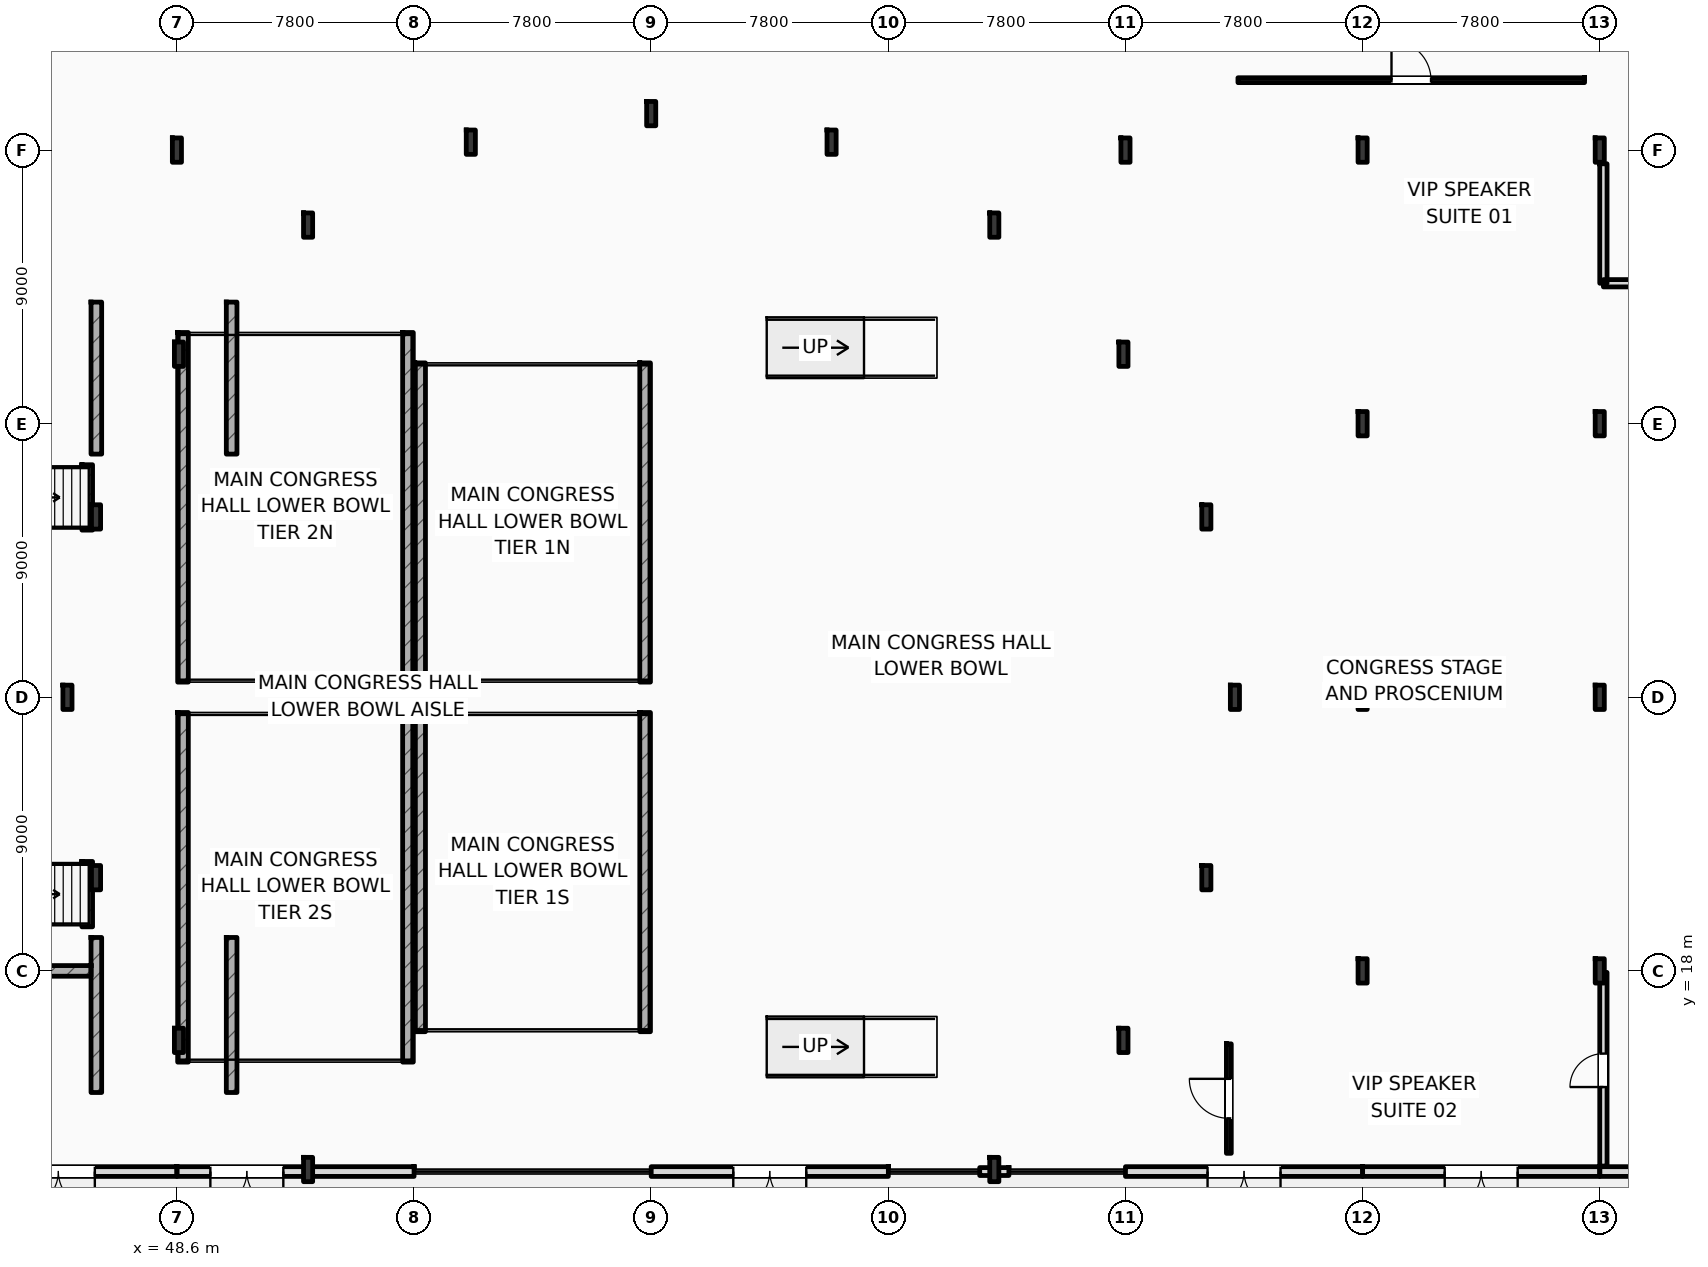
"""IFC4 building model, lengths in metres.
Left out: names, types, materials, properties, quantities, classifications, styles, units other than length and angle.
Written with IfcOpenShell. Run it as: python <this file> out.ifc"""

import sys

from ifc_helpers import new_model, si_unit, direction, frame, frame_2d, origin, origin_2d, place, context, subcontext, project, spatial, rectangle, i_section, extrude, element, fill, save


model = new_model("IFC4")
c1 = context("Model", 3, precision=1e-05, world=origin(), true_north=direction((0.0, 1.0)))
c2 = subcontext(c1, "Body", "Model", "MODEL_VIEW")
j1 = project(units=[si_unit("LENGTHUNIT", "METRE"), si_unit("PLANEANGLEUNIT", "RADIAN")], contexts=[c1])
p1 = place(None, origin())
s1 = spatial("IfcSite", under=j1, at=p1, CompositionType="ELEMENT")
p2 = place(p1, origin())
s2 = spatial("IfcBuilding", under=s1, at=p2, CompositionType="ELEMENT")
p3 = place(p2, origin())
s3 = spatial("IfcBuildingStorey", under=s2, at=p3, CompositionType="ELEMENT", Elevation=0.0)
for number, where, z_axis, x_axis in (
    (1, (48.6, 45.0, 0.0), (0.0, 0.0, 1.0), (1.0, 0.0, 0.0)),
    (2, (79.8, 45.0, 0.0), (0.0, 0.0, 1.0), (1.0, 0.0, 0.0)),
    (3, (87.6, 18.0, 0.0), (0.0, 0.0, 1.0), (1.0, 0.0, 0.0)),
    (4, (87.6, 27.0, 0.0), (0.0, 0.0, 1.0), (1.0, 0.0, 0.0)),
    (5, (87.6, 36.0, 0.0), (0.0, 0.0, 1.0), (1.0, 0.0, 0.0)),
    (6, (87.6, 45.0, 0.0), (0.0, 0.0, 1.0), (1.0, 0.0, 0.0)),
    (7, (95.4, 18.0, 0.0), (0.0, 0.0, 1.0), (1.0, 0.0, 0.0)),
    (8, (95.4, 27.0, 0.0), (0.0, 0.0, 1.0), (1.0, 0.0, 0.0)),
    (9, (95.4, 36.0, 0.0), (0.0, 0.0, 1.0), (1.0, 0.0, 0.0)),
    (10, (95.4, 45.0, 0.0), (0.0, 0.0, 1.0), (1.0, 0.0, 0.0)),
    (11, (83.4, 27.0, 0.0), (0.0, 0.0, 1.0), (1.0, 0.0, 0.0)),
    (12, (82.46, 32.933, 0.0), (0.0, 0.0, 1.0), (1.0, 0.0, 0.0)),
    (13, (79.733, 38.285, 0.0), (0.0, 0.0, 1.0), (1.0, 0.0, 0.0)),
    (14, (75.486, 42.533, 0.0), (0.0, 0.0, 1.0), (1.0, 0.0, 0.0)),
    (15, (70.133, 45.26, 0.0), (0.0, 0.0, 1.0), (1.0, 0.0, 0.0)),
    (16, (64.2, 46.2, 0.0), (0.0, 0.0, 1.0), (1.0, 0.0, 0.0)),
    (17, (58.267, 45.26, 0.0), (0.0, 0.0, 1.0), (1.0, 0.0, 0.0)),
    (18, (52.915, 42.533, 0.0), (0.0, 0.0, 1.0), (1.0, 0.0, 0.0)),
    (19, (48.667, 38.285, 0.0), (0.0, 0.0, 1.0), (1.0, 0.0, 0.0)),
    (20, (45.94, 32.933, 0.0), (0.0, 0.0, 1.0), (1.0, 0.0, 0.0)),
    (21, (45.0, 27.0, 0.0), (0.0, 0.0, 1.0), (1.0, 0.0, 0.0)),
    (22, (45.94, 21.067, 0.0), (0.0, 0.0, 1.0), (1.0, 0.0, 0.0)),
    (23, (48.667, 15.715, 0.0), (0.0, 0.0, 1.0), (1.0, 0.0, 0.0)),
    (24, (52.915, 11.467, 0.0), (0.0, 0.0, 1.0), (1.0, 0.0, 0.0)),
    (25, (75.486, 11.467, 0.0), (0.0, 0.0, 1.0), (1.0, 0.0, 0.0)),
    (26, (79.733, 15.715, 0.0), (0.0, 0.0, 1.0), (1.0, 0.0, 0.0)),
    (27, (82.46, 21.067, 0.0), (0.0, 0.0, 1.0), (1.0, 0.0, 0.0)),
):
    element("IfcColumn", number, at=place(p3, frame(where, z_axis=z_axis, x_axis=x_axis)), inside=s3, PredefinedType="COLUMN", context=c2, shape_type="SweptSolid", body=[
        extrude(i_section(OverallWidth=0.3, OverallDepth=0.8, WebThickness=0.018, FlangeThickness=0.033, FilletRadius=0.03, at=origin_2d()), origin(), (0.0, 0.0, 1.0), 6.0),
    ])
for number, where, z_axis, x_axis in (
    (28, (56.6, 16.0, 0.0), (0.0, 0.0, 1.0), (0.0, 1.0, 0.0)),
    (29, (64.0, 16.0, 0.0), (0.0, 0.0, 1.0), (0.0, 1.0, 0.0)),
    (30, (56.6, 27.5, 0.0), (0.0, 0.0, 1.0), (0.0, 1.0, 0.0)),
    (31, (64.0, 27.5, 0.0), (0.0, 0.0, 1.0), (0.0, 1.0, 0.0)),
):
    element("IfcWall", number, at=place(p3, frame(where, z_axis=z_axis, x_axis=x_axis)), inside=s3, PredefinedType="SHEAR", context=c2, shape_type="SweptSolid", body=[
        extrude(rectangle(XDim=10.5, YDim=0.35, at=frame_2d((5.25, 0.0))), origin(), (0.0, 0.0, 1.0), 1.04),
    ])
for number, where, z_axis, x_axis in (
    (32, (48.8, 15.0, 0.0), (0.0, 0.0, 1.0), (0.0, 1.0, 0.0)),
    (33, (56.2, 15.0, 0.0), (0.0, 0.0, 1.0), (0.0, 1.0, 0.0)),
    (34, (48.8, 27.5, 0.0), (0.0, 0.0, 1.0), (0.0, 1.0, 0.0)),
    (35, (56.2, 27.5, 0.0), (0.0, 0.0, 1.0), (0.0, 1.0, 0.0)),
):
    element("IfcWall", number, at=place(p3, frame(where, z_axis=z_axis, x_axis=x_axis)), inside=s3, PredefinedType="SHEAR", context=c2, shape_type="SweptSolid", body=[
        extrude(rectangle(XDim=11.5, YDim=0.35, at=frame_2d((5.75, 0.0))), origin(), (0.0, 0.0, 1.0), 2.54),
    ])
for number, where, z_axis, x_axis in (
    (36, (45.95, 14.0, 0.0), (0.0, 0.0, 1.0), (0.0, 1.0, 0.0)),
    (37, (50.4, 14.0, 0.0), (0.0, 0.0, 1.0), (0.0, 1.0, 0.0)),
):
    element("IfcWall", number, at=place(p3, frame(where, z_axis=z_axis, x_axis=x_axis)), inside=s3, PredefinedType="SHEAR", context=c2, shape_type="SweptSolid", body=[
        extrude(rectangle(XDim=5.1, YDim=0.35, at=frame_2d((2.55, 0.0))), origin(), (0.0, 0.0, 1.0), 5.7),
    ])
for number, where, z_axis, x_axis in (
    (38, (45.95, 35.0, 0.0), (0.0, 0.0, 1.0), (0.0, 1.0, 0.0)),
    (39, (50.4, 35.0, 0.0), (0.0, 0.0, 1.0), (0.0, 1.0, 0.0)),
):
    element("IfcWall", number, at=place(p3, frame(where, z_axis=z_axis, x_axis=x_axis)), inside=s3, PredefinedType="SHEAR", context=c2, shape_type="SweptSolid", body=[
        extrude(rectangle(XDim=5.0, YDim=0.35, at=frame_2d((2.5, 0.0))), origin(), (0.0, 0.0, 1.0), 5.7),
    ])
p4 = place(p3, frame((33.0, 18.0, 0.0), z_axis=(0.0, 0.0, 1.0), x_axis=(1.0, 0.0, 0.0)))
e40 = element("IfcWall", 40, at=p4, inside=s3, PredefinedType="SHEAR", context=c2, shape_type="SweptSolid", body=[
    extrude(rectangle(XDim=12.775, YDim=0.35, at=frame_2d((6.387, 0.0))), origin(), (0.0, 0.0, 1.0), 5.7),
])
p5 = place(p3, frame((40.8, 11.4, 0.0), z_axis=(0.0, 0.0, 1.0), x_axis=(1.0, 0.0, 0.0)))
e41 = element("IfcWall", 41, at=p5, inside=s3, PredefinedType="STANDARD", context=c2, shape_type="SweptSolid", body=[
    extrude(rectangle(XDim=7.8, YDim=0.32, at=frame_2d((3.9, 0.0))), origin(), (0.0, 0.0, 1.0), 5.7),
])
p6 = place(p5, frame((2.7, 0.0, 0.0)))
e42 = element("IfcOpeningElement", 42, at=p6, cuts=e41, PredefinedType="OPENING", context=c2, shape_type="SweptSolid", body=[
    extrude(rectangle(XDim=2.4, YDim=2.6, at=frame_2d((1.2, 1.3))), frame((0.0, 0.17, 0.0), z_axis=(0.0, -1.0, 0.0), x_axis=(1.0, 0.0, 0.0)), (0.0, 0.0, 1.0), 0.34),
])
p7 = place(p3, frame((48.6, 11.4, 0.0), z_axis=(0.0, 0.0, 1.0), x_axis=(1.0, 0.0, 0.0)))
e43 = element("IfcWall", 43, at=p7, inside=s3, PredefinedType="STANDARD", context=c2, shape_type="SweptSolid", body=[
    extrude(rectangle(XDim=7.8, YDim=0.32, at=frame_2d((3.9, 0.0))), origin(), (0.0, 0.0, 1.0), 5.7),
])
p8 = place(p7, frame((1.1, 0.0, 0.0)))
e44 = element("IfcOpeningElement", 44, at=p8, cuts=e43, PredefinedType="OPENING", context=c2, shape_type="SweptSolid", body=[
    extrude(rectangle(XDim=2.4, YDim=2.6, at=frame_2d((1.2, 1.3))), frame((0.0, 0.17, 0.0), z_axis=(0.0, -1.0, 0.0), x_axis=(1.0, 0.0, 0.0)), (0.0, 0.0, 1.0), 0.34),
])
p9 = place(p3, frame((64.2, 11.4, 0.0), z_axis=(0.0, 0.0, 1.0), x_axis=(1.0, 0.0, 0.0)))
e45 = element("IfcWall", 45, at=p9, inside=s3, PredefinedType="STANDARD", context=c2, shape_type="SweptSolid", body=[
    extrude(rectangle(XDim=7.8, YDim=0.32, at=frame_2d((3.9, 0.0))), origin(), (0.0, 0.0, 1.0), 5.7),
])
p10 = place(p9, frame((2.7, 0.0, 0.0)))
e46 = element("IfcOpeningElement", 46, at=p10, cuts=e45, PredefinedType="OPENING", context=c2, shape_type="SweptSolid", body=[
    extrude(rectangle(XDim=2.4, YDim=2.6, at=frame_2d((1.2, 1.3))), frame((0.0, 0.17, 0.0), z_axis=(0.0, -1.0, 0.0), x_axis=(1.0, 0.0, 0.0)), (0.0, 0.0, 1.0), 0.34),
])
p11 = place(p3, frame((75.006, 11.4, 0.0), z_axis=(0.0, 0.0, 1.0), x_axis=(1.0, 0.0, 0.0)))
e47 = element("IfcWall", 47, at=p11, inside=s3, PredefinedType="STANDARD", context=c2, shape_type="SweptSolid", body=[
    extrude(rectangle(XDim=0.96, YDim=0.26, at=frame_2d((0.48, 0.0))), origin(), (0.0, 0.0, 1.0), 5.3),
])
p12 = place(p3, frame((79.8, 11.4, 0.0), z_axis=(0.0, 0.0, 1.0), x_axis=(1.0, 0.0, 0.0)))
e48 = element("IfcWall", 48, at=p12, inside=s3, PredefinedType="STANDARD", context=c2, shape_type="SweptSolid", body=[
    extrude(rectangle(XDim=7.8, YDim=0.32, at=frame_2d((3.9, 0.0))), origin(), (0.0, 0.0, 1.0), 5.7),
])
p13 = place(p12, frame((2.7, 0.0, 0.0)))
e49 = element("IfcOpeningElement", 49, at=p13, cuts=e48, PredefinedType="OPENING", context=c2, shape_type="SweptSolid", body=[
    extrude(rectangle(XDim=2.4, YDim=2.6, at=frame_2d((1.2, 1.3))), frame((0.0, 0.17, 0.0), z_axis=(0.0, -1.0, 0.0), x_axis=(1.0, 0.0, 0.0)), (0.0, 0.0, 1.0), 0.34),
])
p14 = place(p3, frame((87.6, 11.4, 0.0), z_axis=(0.0, 0.0, 1.0), x_axis=(1.0, 0.0, 0.0)))
e50 = element("IfcWall", 50, at=p14, inside=s3, PredefinedType="STANDARD", context=c2, shape_type="SweptSolid", body=[
    extrude(rectangle(XDim=7.8, YDim=0.32, at=frame_2d((3.9, 0.0))), origin(), (0.0, 0.0, 1.0), 5.7),
])
p15 = place(p14, frame((2.7, 0.0, 0.0)))
e51 = element("IfcOpeningElement", 51, at=p15, cuts=e50, PredefinedType="OPENING", context=c2, shape_type="SweptSolid", body=[
    extrude(rectangle(XDim=2.4, YDim=2.6, at=frame_2d((1.2, 1.3))), frame((0.0, 0.17, 0.0), z_axis=(0.0, -1.0, 0.0), x_axis=(1.0, 0.0, 0.0)), (0.0, 0.0, 1.0), 0.34),
])
p16 = place(p3, frame((95.4, 11.4, 0.0), z_axis=(0.0, 0.0, 1.0), x_axis=(1.0, 0.0, 0.0)))
e52 = element("IfcWall", 52, at=p16, inside=s3, PredefinedType="STANDARD", context=c2, shape_type="SweptSolid", body=[
    extrude(rectangle(XDim=7.8, YDim=0.32, at=frame_2d((3.9, 0.0))), origin(), (0.0, 0.0, 1.0), 5.7),
])
p17 = place(p16, frame((2.7, 0.0, 0.0)))
e53 = element("IfcOpeningElement", 53, at=p17, cuts=e52, PredefinedType="OPENING", context=c2, shape_type="SweptSolid", body=[
    extrude(rectangle(XDim=2.4, YDim=2.6, at=frame_2d((1.2, 1.3))), frame((0.0, 0.17, 0.0), z_axis=(0.0, -1.0, 0.0), x_axis=(1.0, 0.0, 0.0)), (0.0, 0.0, 1.0), 0.34),
])
p18 = place(p3, frame((45.65, 19.45, 0.0), z_axis=(0.0, 0.0, 1.0), x_axis=(0.0, 1.0, 0.0)))
e54 = element("IfcWall", 54, at=p18, inside=s3, PredefinedType="SHEAR", context=c2, shape_type="SweptSolid", body=[
    extrude(rectangle(XDim=2.15, YDim=0.35, at=frame_2d((1.075, 0.0))), origin(), (0.0, 0.0, 1.0), 5.7),
])
p19 = place(p3, frame((45.65, 32.5, 0.0), z_axis=(0.0, 0.0, 1.0), x_axis=(0.0, 1.0, 0.0)))
e55 = element("IfcWall", 55, at=p19, inside=s3, PredefinedType="SHEAR", context=c2, shape_type="SweptSolid", body=[
    extrude(rectangle(XDim=2.15, YDim=0.35, at=frame_2d((1.075, 0.0))), origin(), (0.0, 0.0, 1.0), 5.7),
])
p20 = place(p3, frame((83.5, 47.3, 0.0), z_axis=(0.0, 0.0, 1.0), x_axis=(1.0, 0.0, 0.0)))
e56 = element("IfcWall", 56, at=p20, inside=s3, PredefinedType="PARTITIONING", context=c2, shape_type="SweptSolid", body=[
    extrude(rectangle(XDim=11.4, YDim=0.16, at=frame_2d((5.7, 0.0))), origin(), (0.0, 0.0, 1.0), 5.7),
])
p21 = place(p20, frame((5.05, 0.0, 0.0)))
e57 = element("IfcOpeningElement", 57, at=p21, cuts=e56, PredefinedType="OPENING", context=c2, shape_type="SweptSolid", body=[
    extrude(rectangle(XDim=1.3, YDim=2.2, at=frame_2d((0.65, 1.1))), frame((0.0, 0.09, 0.0), z_axis=(0.0, -1.0, 0.0), x_axis=(1.0, 0.0, 0.0)), (0.0, 0.0, 1.0), 0.18),
])
p22 = place(p3, frame((83.2, 12.0, 0.0), z_axis=(0.0, 0.0, 1.0), x_axis=(0.0, 1.0, 0.0)))
e58 = element("IfcWall", 58, at=p22, inside=s3, PredefinedType="PARTITIONING", context=c2, shape_type="SweptSolid", body=[
    extrude(rectangle(XDim=3.6, YDim=0.16, at=frame_2d((1.8, 0.0))), origin(), (0.0, 0.0, 1.0), 5.7),
])
p23 = place(p22, frame((1.15, 0.0, 0.0)))
e59 = element("IfcOpeningElement", 59, at=p23, cuts=e58, PredefinedType="OPENING", context=c2, shape_type="SweptSolid", body=[
    extrude(rectangle(XDim=1.3, YDim=2.2, at=frame_2d((0.65, 1.1))), frame((0.0, 0.09, 0.0), z_axis=(0.0, -1.0, 0.0), x_axis=(1.0, 0.0, 0.0)), (0.0, 0.0, 1.0), 0.18),
])
p24 = place(p3, frame((95.52, 11.58, 0.0), z_axis=(0.0, 0.0, 1.0), x_axis=(0.0, 1.0, 0.0)))
e60 = element("IfcWall", 60, at=p24, inside=s3, PredefinedType="STANDARD", context=c2, shape_type="SweptSolid", body=[
    extrude(rectangle(XDim=6.37, YDim=0.24, at=frame_2d((3.185, 0.0))), origin(), (0.0, 0.0, 1.0), 5.2),
])
p25 = place(p24, frame((2.6, 0.0, 0.0)))
e61 = element("IfcOpeningElement", 61, at=p25, cuts=e60, PredefinedType="OPENING", context=c2, shape_type="SweptSolid", body=[
    extrude(rectangle(XDim=1.1, YDim=2.2, at=frame_2d((0.55, 1.1))), frame((0.0, 0.13, 0.0), z_axis=(0.0, -1.0, 0.0), x_axis=(1.0, 0.0, 0.0)), (0.0, 0.0, 1.0), 0.26),
])
p26 = place(p3, frame((95.52, 40.62, 0.0), z_axis=(0.0, 0.0, 1.0), x_axis=(1.0, 0.0, 0.0)))
e62 = element("IfcWall", 62, at=p26, inside=s3, PredefinedType="STANDARD", context=c2, shape_type="SweptSolid", body=[
    extrude(rectangle(XDim=7.5, YDim=0.24, at=frame_2d((3.75, 0.0))), origin(), (0.0, 0.0, 1.0), 5.7),
])
p27 = place(p26, frame((3.2, 0.0, 0.0)))
e63 = element("IfcOpeningElement", 63, at=p27, cuts=e62, PredefinedType="OPENING", context=c2, shape_type="SweptSolid", body=[
    extrude(rectangle(XDim=1.1, YDim=2.2, at=frame_2d((0.55, 1.1))), frame((0.0, 0.13, 0.0), z_axis=(0.0, -1.0, 0.0), x_axis=(1.0, 0.0, 0.0)), (0.0, 0.0, 1.0), 0.26),
])
p28 = place(p3, frame((95.52, 40.62, 0.0), z_axis=(0.0, 0.0, 1.0), x_axis=(0.0, 1.0, 0.0)))
e64 = element("IfcWall", 64, at=p28, inside=s3, PredefinedType="STANDARD", context=c2, shape_type="SweptSolid", body=[
    extrude(rectangle(XDim=3.93, YDim=0.24, at=frame_2d((1.965, 0.0))), origin(), (0.0, 0.0, 1.0), 5.2),
])
p29 = place(p6, frame((2.4, 0.0, 0.0), z_axis=(0.0, 0.0, 1.0), x_axis=(-1.0, 0.0, 0.0)))
e65 = element("IfcDoor", 65, at=p29, inside=s3, OperationType="DOUBLE_SWING_LEFT", PredefinedType="DOOR", context=c2, shape_type="SweptSolid", body=[
    extrude(rectangle(XDim=2.4, YDim=2.6, at=frame_2d((1.2, 1.3))), frame((0.0, 0.025, 0.0), z_axis=(0.0, -1.0, 0.0), x_axis=(1.0, 0.0, 0.0)), (0.0, 0.0, 1.0), 0.05),
])
fill(e42, e65)
p30 = place(p8, frame((2.4, 0.0, 0.0), z_axis=(0.0, 0.0, 1.0), x_axis=(-1.0, 0.0, 0.0)))
e66 = element("IfcDoor", 66, at=p30, inside=s3, OperationType="DOUBLE_SWING_LEFT", PredefinedType="DOOR", context=c2, shape_type="SweptSolid", body=[
    extrude(rectangle(XDim=2.4, YDim=2.6, at=frame_2d((1.2, 1.3))), frame((0.0, 0.025, 0.0), z_axis=(0.0, -1.0, 0.0), x_axis=(1.0, 0.0, 0.0)), (0.0, 0.0, 1.0), 0.05),
])
fill(e44, e66)
p31 = place(p10, frame((2.4, 0.0, 0.0), z_axis=(0.0, 0.0, 1.0), x_axis=(-1.0, 0.0, 0.0)))
e67 = element("IfcDoor", 67, at=p31, inside=s3, OperationType="DOUBLE_SWING_LEFT", PredefinedType="DOOR", context=c2, shape_type="SweptSolid", body=[
    extrude(rectangle(XDim=2.4, YDim=2.6, at=frame_2d((1.2, 1.3))), frame((0.0, 0.025, 0.0), z_axis=(0.0, -1.0, 0.0), x_axis=(1.0, 0.0, 0.0)), (0.0, 0.0, 1.0), 0.05),
])
fill(e46, e67)
p32 = place(p13, frame((2.4, 0.0, 0.0), z_axis=(0.0, 0.0, 1.0), x_axis=(-1.0, 0.0, 0.0)))
e68 = element("IfcDoor", 68, at=p32, inside=s3, OperationType="DOUBLE_SWING_LEFT", PredefinedType="DOOR", context=c2, shape_type="SweptSolid", body=[
    extrude(rectangle(XDim=2.4, YDim=2.6, at=frame_2d((1.2, 1.3))), frame((0.0, 0.025, 0.0), z_axis=(0.0, -1.0, 0.0), x_axis=(1.0, 0.0, 0.0)), (0.0, 0.0, 1.0), 0.05),
])
fill(e49, e68)
p33 = place(p15, frame((2.4, 0.0, 0.0), z_axis=(0.0, 0.0, 1.0), x_axis=(-1.0, 0.0, 0.0)))
e69 = element("IfcDoor", 69, at=p33, inside=s3, OperationType="DOUBLE_SWING_LEFT", PredefinedType="DOOR", context=c2, shape_type="SweptSolid", body=[
    extrude(rectangle(XDim=2.4, YDim=2.6, at=frame_2d((1.2, 1.3))), frame((0.0, 0.025, 0.0), z_axis=(0.0, -1.0, 0.0), x_axis=(1.0, 0.0, 0.0)), (0.0, 0.0, 1.0), 0.05),
])
fill(e51, e69)
p34 = place(p21, origin())
e70 = element("IfcDoor", 70, at=p34, inside=s3, OperationType="SINGLE_SWING_LEFT", PredefinedType="DOOR", context=c2, shape_type="SweptSolid", body=[
    extrude(rectangle(XDim=1.3, YDim=2.2, at=frame_2d((0.65, 1.1))), frame((0.0, 0.025, 0.0), z_axis=(0.0, -1.0, 0.0), x_axis=(1.0, 0.0, 0.0)), (0.0, 0.0, 1.0), 0.05),
])
fill(e57, e70)
p35 = place(p23, origin())
e71 = element("IfcDoor", 71, at=p35, inside=s3, OperationType="SINGLE_SWING_RIGHT", PredefinedType="DOOR", context=c2, shape_type="SweptSolid", body=[
    extrude(rectangle(XDim=1.3, YDim=2.2, at=frame_2d((0.65, 1.1))), frame((0.0, 0.025, 0.0), z_axis=(0.0, -1.0, 0.0), x_axis=(1.0, 0.0, 0.0)), (0.0, 0.0, 1.0), 0.05),
])
fill(e59, e71)
p36 = place(p25, origin())
e72 = element("IfcDoor", 72, at=p36, inside=s3, OperationType="SINGLE_SWING_LEFT", PredefinedType="DOOR", context=c2, shape_type="SweptSolid", body=[
    extrude(rectangle(XDim=1.1, YDim=2.2, at=frame_2d((0.55, 1.1))), frame((0.0, 0.025, 0.0), z_axis=(0.0, -1.0, 0.0), x_axis=(1.0, 0.0, 0.0)), (0.0, 0.0, 1.0), 0.05),
])
fill(e61, e72)
save(model, sys.argv[1])
